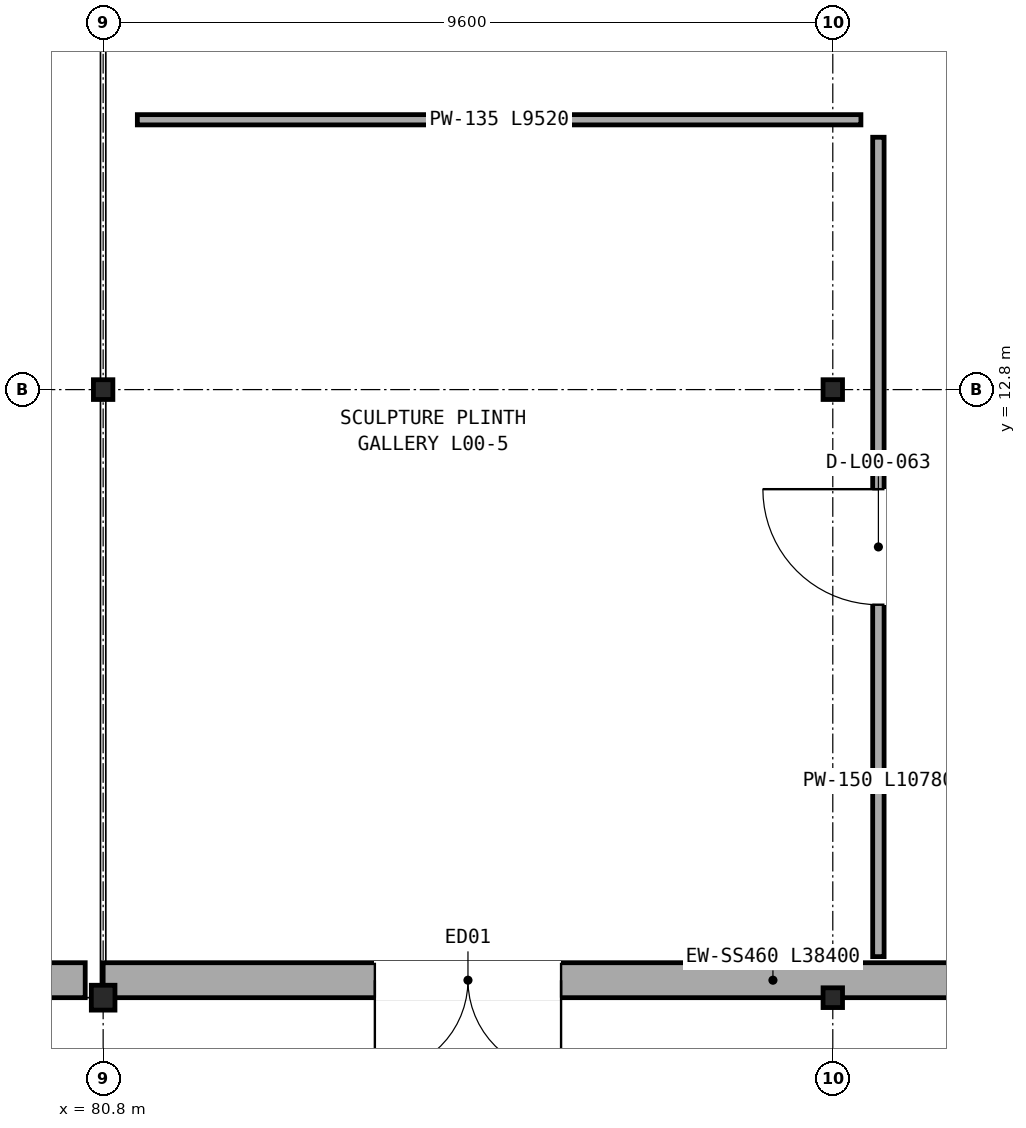
"""IFC4 building model, lengths in metres.
Left out: names, types, materials, properties, quantities, classifications, styles, units other than length and angle.
Written with IfcOpenShell. Run it as: python <this file> out.ifc"""

import sys

from ifc_helpers import new_model, si_unit, direction, frame, frame_2d, origin, origin_2d, place, context, subcontext, project, spatial, rectangle, i_section, extrude, element, fill, save


model = new_model("IFC4")
c1 = context("Model", 3, precision=1e-05, world=origin(), true_north=direction((0.0, 1.0)))
c2 = subcontext(c1, "Body", "Model", "MODEL_VIEW")
j1 = project(units=[si_unit("LENGTHUNIT", "METRE"), si_unit("PLANEANGLEUNIT", "RADIAN")], contexts=[c1])
p1 = place(None, origin())
s1 = spatial("IfcSite", under=j1, at=p1, CompositionType="ELEMENT")
p2 = place(p1, origin())
s2 = spatial("IfcBuilding", under=s1, at=p2, CompositionType="ELEMENT")
p3 = place(p2, origin())
s3 = spatial("IfcBuildingStorey", under=s2, at=p3, CompositionType="ELEMENT", Elevation=0.0)
for number, where, z_axis, x_axis in (
    (1, (90.4, 4.8, 0.0), (0.0, 0.0, 1.0), (1.0, 0.0, 0.0)),
    (2, (90.4, 12.8, 0.0), (0.0, 0.0, 1.0), (1.0, 0.0, 0.0)),
):
    element("IfcColumn", number, at=place(p3, frame(where, z_axis=z_axis, x_axis=x_axis)), inside=s3, PredefinedType="COLUMN", context=c2, shape_type="SweptSolid", body=[
        extrude(i_section(OverallWidth=0.256, OverallDepth=0.26, WebThickness=0.01, FlangeThickness=0.017, FilletRadius=0.013, at=origin_2d()), origin(), (0.0, 0.0, 1.0), 5.6),
    ])
p4 = place(p3, frame((80.8, 4.8, 0.0), z_axis=(0.0, 0.0, 1.0), x_axis=(1.0, 0.0, 0.0)))
e3 = element("IfcColumn", 3, at=p4, inside=s3, PredefinedType="COLUMN", context=c2, shape_type="SweptSolid", body=[
    extrude(i_section(OverallWidth=0.311, OverallDepth=0.327, WebThickness=0.016, FlangeThickness=0.025, FilletRadius=0.017, at=origin_2d()), origin(), (0.0, 0.0, 1.0), 5.6),
])
p5 = place(p3, frame((80.8, 12.8, 0.0), z_axis=(0.0, 0.0, 1.0), x_axis=(1.0, 0.0, 0.0)))
e4 = element("IfcColumn", 4, at=p5, inside=s3, PredefinedType="COLUMN", context=c2, shape_type="SweptSolid", body=[
    extrude(i_section(OverallWidth=0.256, OverallDepth=0.26, WebThickness=0.01, FlangeThickness=0.017, FilletRadius=0.013, at=origin_2d()), origin(), (0.0, 0.0, 1.0), 5.6),
])
p6 = place(p3, frame((80.8, 5.03, 0.0), z_axis=(0.0, 0.0, 1.0), x_axis=(1.0, 0.0, 0.0)))
e5 = element("IfcWall", 5, at=p6, inside=s3, PredefinedType="SOLIDWALL", context=c2, shape_type="SweptSolid", body=[
    extrude(rectangle(XDim=38.4, YDim=0.46, at=frame_2d((19.2, 0.0))), origin(), (0.0, 0.0, 1.0), 4.802),
])
p7 = place(p6, frame((3.575, 0.0, 0.0)))
e6 = element("IfcOpeningElement", 6, at=p7, cuts=e5, PredefinedType="OPENING", context=c2, shape_type="SweptSolid", body=[
    extrude(rectangle(XDim=2.45, YDim=2.5, at=frame_2d((1.225, 1.25))), frame((0.0, 0.24, 0.0), z_axis=(0.0, -1.0, 0.0), x_axis=(1.0, 0.0, 0.0)), (0.0, 0.0, 1.0), 0.48),
])
p8 = place(p6, frame((11.6, 0.0, 0.0)))
e7 = element("IfcOpeningElement", 7, at=p8, cuts=e5, PredefinedType="OPENING", context=c2, shape_type="SweptSolid", body=[
    extrude(rectangle(XDim=2.4, YDim=2.45, at=frame_2d((1.2, 1.225))), frame((0.0, 0.24, 0.0), z_axis=(0.0, -1.0, 0.0), x_axis=(1.0, 0.0, 0.0)), (0.0, 0.0, 1.0), 0.48),
])
p9 = place(p6, frame((14.85, 0.0, 0.0)))
e8 = element("IfcOpeningElement", 8, at=p9, cuts=e5, PredefinedType="OPENING", context=c2, shape_type="SweptSolid", body=[
    extrude(rectangle(XDim=2.3, YDim=2.4, at=frame_2d((1.15, 1.2))), frame((0.0, 0.24, 0.0), z_axis=(0.0, -1.0, 0.0), x_axis=(1.0, 0.0, 0.0)), (0.0, 0.0, 1.0), 0.48),
])
p10 = place(p6, frame((21.15, 0.0, 0.0)))
e9 = element("IfcOpeningElement", 9, at=p10, cuts=e5, PredefinedType="OPENING", context=c2, shape_type="SweptSolid", body=[
    extrude(rectangle(XDim=2.5, YDim=2.55, at=frame_2d((1.25, 1.275))), frame((0.0, 0.24, 0.0), z_axis=(0.0, -1.0, 0.0), x_axis=(1.0, 0.0, 0.0)), (0.0, 0.0, 1.0), 0.48),
])
p11 = place(p6, frame((24.375, 0.0, 0.0)))
e10 = element("IfcOpeningElement", 10, at=p11, cuts=e5, PredefinedType="OPENING", context=c2, shape_type="SweptSolid", body=[
    extrude(rectangle(XDim=2.45, YDim=2.5, at=frame_2d((1.225, 1.25))), frame((0.0, 0.24, 0.0), z_axis=(0.0, -1.0, 0.0), x_axis=(1.0, 0.0, 0.0)), (0.0, 0.0, 1.0), 0.48),
])
p12 = place(p6, frame((32.4, 0.0, 0.0)))
e11 = element("IfcOpeningElement", 11, at=p12, cuts=e5, PredefinedType="OPENING", context=c2, shape_type="SweptSolid", body=[
    extrude(rectangle(XDim=2.4, YDim=2.45, at=frame_2d((1.2, 1.225))), frame((0.0, 0.24, 0.0), z_axis=(0.0, -1.0, 0.0), x_axis=(1.0, 0.0, 0.0)), (0.0, 0.0, 1.0), 0.48),
])
p13 = place(p3, frame((42.636, 5.03, 0.0), z_axis=(0.0, 0.0, 1.0), x_axis=(1.0, 0.0, 0.0)))
e12 = element("IfcWall", 12, at=p13, inside=s3, PredefinedType="SOLIDWALL", context=c2, shape_type="SweptSolid", body=[
    extrude(rectangle(XDim=37.928, YDim=0.46, at=frame_2d((18.964, 0.0))), origin(), (0.0, 0.0, 1.0), 4.802),
])
p14 = place(p13, frame((29.614, 0.0, 0.0)))
e13 = element("IfcOpeningElement", 13, at=p14, cuts=e12, PredefinedType="OPENING", context=c2, shape_type="SweptSolid", body=[
    extrude(rectangle(XDim=2.4, YDim=2.45, at=frame_2d((1.2, 1.225))), frame((0.0, 0.24, 0.0), z_axis=(0.0, -1.0, 0.0), x_axis=(1.0, 0.0, 0.0)), (0.0, 0.0, 1.0), 0.48),
])
p15 = place(p13, frame((1.8, 0.0, 0.9)))
e14 = element("IfcOpeningElement", 14, at=p15, cuts=e12, PredefinedType="OPENING", context=c2, shape_type="SweptSolid", body=[
    extrude(rectangle(XDim=2.12, YDim=1.85, at=frame_2d((1.06, 0.925))), frame((0.0, 0.24, 0.0), z_axis=(0.0, -1.0, 0.0), x_axis=(1.0, 0.0, 0.0)), (0.0, 0.0, 1.0), 0.48),
])
p16 = place(p13, frame((6.4, 0.0, 0.9)))
e15 = element("IfcOpeningElement", 15, at=p16, cuts=e12, PredefinedType="OPENING", context=c2, shape_type="SweptSolid", body=[
    extrude(rectangle(XDim=2.2, YDim=1.85, at=frame_2d((1.1, 0.925))), frame((0.0, 0.24, 0.0), z_axis=(0.0, -1.0, 0.0), x_axis=(1.0, 0.0, 0.0)), (0.0, 0.0, 1.0), 0.48),
])
p17 = place(p13, frame((11.0, 0.0, 0.9)))
e16 = element("IfcOpeningElement", 16, at=p17, cuts=e12, PredefinedType="OPENING", context=c2, shape_type="SweptSolid", body=[
    extrude(rectangle(XDim=2.4, YDim=1.85, at=frame_2d((1.2, 0.925))), frame((0.0, 0.24, 0.0), z_axis=(0.0, -1.0, 0.0), x_axis=(1.0, 0.0, 0.0)), (0.0, 0.0, 1.0), 0.48),
])
p18 = place(p13, frame((15.6, 0.0, 0.9)))
e17 = element("IfcOpeningElement", 17, at=p18, cuts=e12, PredefinedType="OPENING", context=c2, shape_type="SweptSolid", body=[
    extrude(rectangle(XDim=2.65, YDim=1.85, at=frame_2d((1.325, 0.925))), frame((0.0, 0.24, 0.0), z_axis=(0.0, -1.0, 0.0), x_axis=(1.0, 0.0, 0.0)), (0.0, 0.0, 1.0), 0.48),
])
p19 = place(p13, frame((20.2, 0.0, 0.9)))
e18 = element("IfcOpeningElement", 18, at=p19, cuts=e12, PredefinedType="OPENING", context=c2, shape_type="SweptSolid", body=[
    extrude(rectangle(XDim=0.95, YDim=2.15, at=frame_2d((0.475, 1.075))), frame((0.0, 0.24, 0.0), z_axis=(0.0, -1.0, 0.0), x_axis=(1.0, 0.0, 0.0)), (0.0, 0.0, 1.0), 0.48),
])
p20 = place(p13, frame((24.8, 0.0, 0.9)))
e19 = element("IfcOpeningElement", 19, at=p20, cuts=e12, PredefinedType="OPENING", context=c2, shape_type="SweptSolid", body=[
    extrude(rectangle(XDim=1.1, YDim=2.15, at=frame_2d((0.55, 1.075))), frame((0.0, 0.24, 0.0), z_axis=(0.0, -1.0, 0.0), x_axis=(1.0, 0.0, 0.0)), (0.0, 0.0, 1.0), 0.48),
])
p21 = place(p3, frame((91.0, 16.12, 0.0), z_axis=(0.0, 0.0, 1.0), x_axis=(0.0, -1.0, 0.0)))
e20 = element("IfcWall", 20, at=p21, inside=s3, PredefinedType="PARTITIONING", context=c2, shape_type="SweptSolid", body=[
    extrude(rectangle(XDim=10.78, YDim=0.15, at=frame_2d((5.39, 0.0))), origin(), (0.0, 0.0, 1.0), 4.748),
])
p22 = place(p21, frame((4.63, 0.0, 0.0)))
e21 = element("IfcOpeningElement", 21, at=p22, cuts=e20, PredefinedType="OPENING", context=c2, shape_type="SweptSolid", body=[
    extrude(rectangle(XDim=1.52, YDim=2.34, at=frame_2d((0.76, 1.17))), frame((0.0, 0.085, 0.0), z_axis=(0.0, -1.0, 0.0), x_axis=(1.0, 0.0, 0.0)), (0.0, 0.0, 1.0), 0.17),
])
p23 = place(p3, frame((81.25, 16.35, 0.0), z_axis=(0.0, 0.0, 1.0), x_axis=(1.0, 0.0, 0.0)))
e22 = element("IfcWall", 22, at=p23, inside=s3, PredefinedType="PARTITIONING", context=c2, shape_type="SweptSolid", body=[
    extrude(rectangle(XDim=9.52, YDim=0.135, at=frame_2d((4.76, 0.0))), origin(), (0.0, 0.0, 1.0), 4.827),
])
p24 = place(p7, frame((2.45, 0.0, 0.0), z_axis=(0.0, 0.0, 1.0), x_axis=(-1.0, 0.0, 0.0)))
e23 = element("IfcDoor", 23, at=p24, inside=s3, OperationType="DOUBLE_DOOR_SINGLE_SWING", PredefinedType="DOOR", context=c2, shape_type="SweptSolid", body=[
    extrude(rectangle(XDim=2.45, YDim=2.5, at=frame_2d((1.225, 1.25))), frame((0.0, 0.025, 0.0), z_axis=(0.0, -1.0, 0.0), x_axis=(1.0, 0.0, 0.0)), (0.0, 0.0, 1.0), 0.05),
])
fill(e6, e23)
p25 = place(p22, frame((1.52, 0.0, 0.0), z_axis=(0.0, 0.0, 1.0), x_axis=(-1.0, 0.0, 0.0)))
e24 = element("IfcDoor", 24, at=p25, inside=s3, OperationType="SINGLE_SWING_LEFT", PredefinedType="DOOR", context=c2, shape_type="SweptSolid", body=[
    extrude(rectangle(XDim=1.52, YDim=2.34, at=frame_2d((0.76, 1.17))), frame((0.0, 0.025, 0.0), z_axis=(0.0, -1.0, 0.0), x_axis=(1.0, 0.0, 0.0)), (0.0, 0.0, 1.0), 0.05),
])
fill(e21, e24)
save(model, sys.argv[1])
